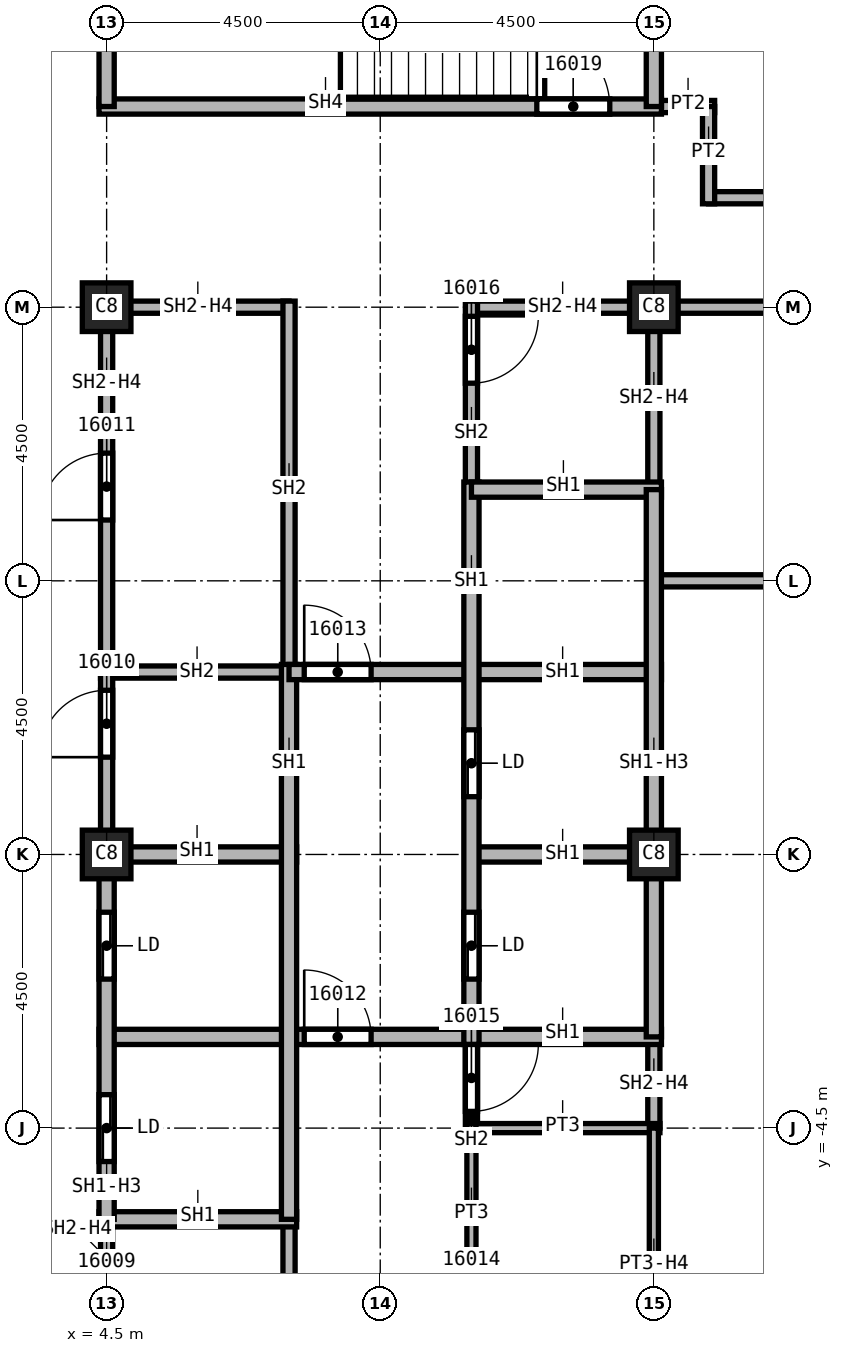
"""IFC4 building model, lengths in metres.
Left out: names, types, materials, properties, quantities, classifications, styles, units other than length and angle.
Written with IfcOpenShell. Run it as: python <this file> out.ifc"""

import sys

from ifc_helpers import new_model, si_unit, direction, frame, frame_2d, origin, origin_2d, place, context, subcontext, project, spatial, rectangle, extrude, element, fill, save


model = new_model("IFC4")
c1 = context("Model", 3, precision=1e-05, world=origin(), true_north=direction((0.0, 1.0)))
c2 = subcontext(c1, "Body", "Model", "MODEL_VIEW")
j1 = project(units=[si_unit("LENGTHUNIT", "METRE"), si_unit("PLANEANGLEUNIT", "RADIAN")], contexts=[c1])
p1 = place(None, origin())
s1 = spatial("IfcSite", under=j1, at=p1, CompositionType="ELEMENT")
p2 = place(p1, origin())
s2 = spatial("IfcBuilding", under=s1, at=p2, CompositionType="ELEMENT")
p3 = place(p2, frame((0.0, 0.0, 246.0)))
s3 = spatial("IfcBuildingStorey", under=s2, at=p3, CompositionType="ELEMENT", Elevation=246.0)
for number, where, z_axis, x_axis in (
    (1, (4.5, 0.0, 0.0), (0.0, 0.0, 1.0), (1.0, 0.0, 0.0)),
    (2, (4.5, 9.0, 0.0), (0.0, 0.0, 1.0), (1.0, 0.0, 0.0)),
    (3, (13.5, 0.0, 0.0), (0.0, 0.0, 1.0), (1.0, 0.0, 0.0)),
    (4, (13.5, 9.0, 0.0), (0.0, 0.0, 1.0), (1.0, 0.0, 0.0)),
):
    element("IfcColumn", number, at=place(p3, frame(where, z_axis=z_axis, x_axis=x_axis)), inside=s3, PredefinedType="COLUMN", context=c2, shape_type="SweptSolid", body=[
        extrude(rectangle(XDim=0.8, YDim=0.8, at=origin_2d()), origin(), (0.0, 0.0, 1.0), 3.72),
    ])
p4 = place(p3, frame((13.375, 12.3, 0.0), z_axis=(0.0, 0.0, 1.0), x_axis=(1.0, 0.0, 0.0)))
e5 = element("IfcWall", 5, at=p4, inside=s3, PredefinedType="PARTITIONING", context=c2, shape_type="SweptSolid", body=[
    extrude(rectangle(XDim=1.125, YDim=0.2, at=frame_2d((0.562, 0.0))), origin(), (0.0, 0.0, 1.0), 3.72),
])
for number, where, z_axis, x_axis in (
    (6, (13.5, 4.5, 0.0), (0.0, 0.0, 1.0), (1.0, 0.0, 0.0)),
    (7, (18.0, 9.0, 0.0), (0.0, 0.0, 1.0), (-1.0, 0.0, 0.0)),
):
    element("IfcWall", number, at=place(p3, frame(where, z_axis=z_axis, x_axis=x_axis)), inside=s3, PredefinedType="PARTITIONING", context=c2, shape_type="SweptSolid", body=[
        extrude(rectangle(XDim=4.5, YDim=0.2, at=frame_2d((2.25, 0.0))), origin(), (0.0, 0.0, 1.0), 3.72),
    ])
p5 = place(p3, frame((14.4, 10.8, 0.0), z_axis=(0.0, 0.0, 1.0), x_axis=(1.0, 0.0, 0.0)))
e8 = element("IfcWall", 8, at=p5, inside=s3, PredefinedType="PARTITIONING", context=c2, shape_type="SweptSolid", body=[
    extrude(rectangle(XDim=3.6, YDim=0.2, at=frame_2d((1.8, 0.0))), origin(), (0.0, 0.0, 1.0), 3.72),
])
p6 = place(p3, frame((14.4, 12.3, 0.0), z_axis=(0.0, 0.0, 1.0), x_axis=(0.0, -1.0, 0.0)))
e9 = element("IfcWall", 9, at=p6, inside=s3, PredefinedType="PARTITIONING", context=c2, shape_type="SweptSolid", body=[
    extrude(rectangle(XDim=1.6, YDim=0.2, at=frame_2d((0.8, 0.0))), origin(), (0.0, 0.0, 1.0), 3.72),
])
p7 = place(p3, frame((4.4, 3.0, 0.0), z_axis=(0.0, 0.0, 1.0), x_axis=(1.0, 0.0, 0.0)))
e10 = element("IfcWall", 10, at=p7, inside=s3, PredefinedType="SOLIDWALL", context=c2, shape_type="SweptSolid", body=[
    extrude(rectangle(XDim=3.225, YDim=0.2, at=frame_2d((1.613, 0.0))), origin(), (0.0, 0.0, 1.0), 3.72),
])
p8 = place(p3, frame((4.5, -9.1, 0.0), z_axis=(0.0, 0.0, 1.0), x_axis=(0.0, 1.0, 0.0)))
e11 = element("IfcWall", 11, at=p8, inside=s3, PredefinedType="SOLIDWALL", context=c2, shape_type="SweptSolid", body=[
    extrude(rectangle(XDim=3.1, YDim=0.2, at=frame_2d((1.55, 0.0))), origin(), (0.0, 0.0, 1.0), 3.042),
])
p9 = place(p8, frame((0.85, 0.0, 0.0)))
e12 = element("IfcOpeningElement", 12, at=p9, cuts=e11, PredefinedType="OPENING", context=c2, shape_type="SweptSolid", body=[
    extrude(rectangle(XDim=1.1, YDim=2.1, at=frame_2d((0.55, 1.05))), frame((0.0, 0.1, 0.0), z_axis=(0.0, -1.0, 0.0), x_axis=(1.0, 0.0, 0.0)), (0.0, 0.0, 1.0), 0.2),
])
p10 = place(p3, frame((4.5, 0.0, 0.0), z_axis=(0.0, 0.0, 1.0), x_axis=(0.0, 1.0, 0.0)))
e13 = element("IfcWall", 13, at=p10, inside=s3, PredefinedType="SOLIDWALL", context=c2, shape_type="SweptSolid", body=[
    extrude(rectangle(XDim=9.1, YDim=0.2, at=frame_2d((4.55, 0.0))), origin(), (0.0, 0.0, 1.0), 3.042),
])
p11 = place(p10, frame((1.6, 0.0, 0.0)))
e14 = element("IfcOpeningElement", 14, at=p11, cuts=e13, PredefinedType="OPENING", context=c2, shape_type="SweptSolid", body=[
    extrude(rectangle(XDim=1.1, YDim=2.1, at=frame_2d((0.55, 1.05))), frame((0.0, 0.1, 0.0), z_axis=(0.0, -1.0, 0.0), x_axis=(1.0, 0.0, 0.0)), (0.0, 0.0, 1.0), 0.2),
])
p12 = place(p10, frame((5.5, 0.0, 0.0)))
e15 = element("IfcOpeningElement", 15, at=p12, cuts=e13, PredefinedType="OPENING", context=c2, shape_type="SweptSolid", body=[
    extrude(rectangle(XDim=1.1, YDim=2.1, at=frame_2d((0.55, 1.05))), frame((0.0, 0.1, 0.0), z_axis=(0.0, -1.0, 0.0), x_axis=(1.0, 0.0, 0.0)), (0.0, 0.0, 1.0), 0.2),
])
p13 = place(p3, frame((4.5, 9.0, 0.0), z_axis=(0.0, 0.0, 1.0), x_axis=(1.0, 0.0, 0.0)))
e16 = element("IfcWall", 16, at=p13, inside=s3, PredefinedType="SOLIDWALL", context=c2, shape_type="SweptSolid", body=[
    extrude(rectangle(XDim=3.0, YDim=0.2, at=frame_2d((1.5, 0.0))), origin(), (0.0, 0.0, 1.0), 3.042),
])
p14 = place(p3, frame((7.5, -6.0, 0.0), z_axis=(0.0, 0.0, 1.0), x_axis=(0.0, -1.0, 0.0)))
e17 = element("IfcWall", 17, at=p14, inside=s3, PredefinedType="SOLIDWALL", context=c2, shape_type="SweptSolid", body=[
    extrude(rectangle(XDim=3.1, YDim=0.2, at=frame_2d((1.55, 0.0))), origin(), (0.0, 0.0, 1.0), 3.72),
])
p15 = place(p3, frame((7.5, 9.1, 0.0), z_axis=(0.0, 0.0, 1.0), x_axis=(0.0, -1.0, 0.0)))
e18 = element("IfcWall", 18, at=p15, inside=s3, PredefinedType="SOLIDWALL", context=c2, shape_type="SweptSolid", body=[
    extrude(rectangle(XDim=6.225, YDim=0.2, at=frame_2d((3.113, 0.0))), origin(), (0.0, 0.0, 1.0), 3.72),
])
p16 = place(p3, frame((10.5, -2.875, 0.0), z_axis=(0.0, 0.0, 1.0), x_axis=(0.0, -1.0, 0.0)))
e19 = element("IfcWall", 19, at=p16, inside=s3, PredefinedType="SOLIDWALL", context=c2, shape_type="SweptSolid", body=[
    extrude(rectangle(XDim=1.7, YDim=0.2, at=frame_2d((0.85, 0.0))), origin(), (0.0, 0.0, 1.0), 3.72),
])
p17 = place(p16, frame((0.25, 0.0, 0.0)))
e20 = element("IfcOpeningElement", 20, at=p17, cuts=e19, PredefinedType="OPENING", context=c2, shape_type="SweptSolid", body=[
    extrude(rectangle(XDim=1.1, YDim=2.1, at=frame_2d((0.55, 1.05))), frame((0.0, 0.1, 0.0), z_axis=(0.0, -1.0, 0.0), x_axis=(1.0, 0.0, 0.0)), (0.0, 0.0, 1.0), 0.2),
])
p18 = place(p3, frame((10.5, 9.0, 0.0), z_axis=(0.0, 0.0, 1.0), x_axis=(1.0, 0.0, 0.0)))
e21 = element("IfcWall", 21, at=p18, inside=s3, PredefinedType="SOLIDWALL", context=c2, shape_type="SweptSolid", body=[
    extrude(rectangle(XDim=3.1, YDim=0.2, at=frame_2d((1.55, 0.0))), origin(), (0.0, 0.0, 1.0), 3.042),
])
p19 = place(p3, frame((10.5, 9.1, 0.0), z_axis=(0.0, 0.0, 1.0), x_axis=(0.0, -1.0, 0.0)))
e22 = element("IfcWall", 22, at=p19, inside=s3, PredefinedType="SOLIDWALL", context=c2, shape_type="SweptSolid", body=[
    extrude(rectangle(XDim=3.225, YDim=0.2, at=frame_2d((1.613, 0.0))), origin(), (0.0, 0.0, 1.0), 3.72),
])
p20 = place(p19, frame((0.25, 0.0, 0.0)))
e23 = element("IfcOpeningElement", 23, at=p20, cuts=e22, PredefinedType="OPENING", context=c2, shape_type="SweptSolid", body=[
    extrude(rectangle(XDim=1.1, YDim=2.1, at=frame_2d((0.55, 1.05))), frame((0.0, 0.1, 0.0), z_axis=(0.0, -1.0, 0.0), x_axis=(1.0, 0.0, 0.0)), (0.0, 0.0, 1.0), 0.2),
])
p21 = place(p3, frame((13.5, -3.0, 0.0), z_axis=(0.0, 0.0, 1.0), x_axis=(0.0, -1.0, 0.0)))
e24 = element("IfcWall", 24, at=p21, inside=s3, PredefinedType="SOLIDWALL", context=c2, shape_type="SweptSolid", body=[
    extrude(rectangle(XDim=1.5, YDim=0.2, at=frame_2d((0.75, 0.0))), origin(), (0.0, 0.0, 1.0), 3.042),
])
p22 = place(p3, frame((13.5, 9.1, 0.0), z_axis=(0.0, 0.0, 1.0), x_axis=(0.0, -1.0, 0.0)))
e25 = element("IfcWall", 25, at=p22, inside=s3, PredefinedType="SOLIDWALL", context=c2, shape_type="SweptSolid", body=[
    extrude(rectangle(XDim=3.1, YDim=0.2, at=frame_2d((1.55, 0.0))), origin(), (0.0, 0.0, 1.0), 3.042),
])
p23 = place(p3, frame((4.375, -6.0, 0.0), z_axis=(0.0, 0.0, 1.0), x_axis=(1.0, 0.0, 0.0)))
e26 = element("IfcWall", 26, at=p23, inside=s3, PredefinedType="SOLIDWALL", context=c2, shape_type="SweptSolid", body=[
    extrude(rectangle(XDim=3.25, YDim=0.25, at=frame_2d((1.625, 0.0))), origin(), (0.0, 0.0, 1.0), 3.72),
])
p24 = place(p3, frame((4.375, -3.0, 0.0), z_axis=(0.0, 0.0, 1.0), x_axis=(1.0, 0.0, 0.0)))
e27 = element("IfcWall", 27, at=p24, inside=s3, PredefinedType="SOLIDWALL", context=c2, shape_type="SweptSolid", body=[
    extrude(rectangle(XDim=9.25, YDim=0.25, at=frame_2d((4.625, 0.0))), origin(), (0.0, 0.0, 1.0), 3.72),
])
p25 = place(p24, frame((3.375, 0.0, 0.0)))
e28 = element("IfcOpeningElement", 28, at=p25, cuts=e27, PredefinedType="OPENING", context=c2, shape_type="SweptSolid", body=[
    extrude(rectangle(XDim=1.1, YDim=2.1, at=frame_2d((0.55, 1.05))), frame((0.0, 0.125, 0.0), z_axis=(0.0, -1.0, 0.0), x_axis=(1.0, 0.0, 0.0)), (0.0, 0.0, 1.0), 0.25),
])
p26 = place(p3, frame((4.375, 0.0, 0.0), z_axis=(0.0, 0.0, 1.0), x_axis=(1.0, 0.0, 0.0)))
e29 = element("IfcWall", 29, at=p26, inside=s3, PredefinedType="SOLIDWALL", context=c2, shape_type="SweptSolid", body=[
    extrude(rectangle(XDim=3.25, YDim=0.25, at=frame_2d((1.625, 0.0))), origin(), (0.0, 0.0, 1.0), 3.72),
])
p27 = place(p3, frame((4.5, -6.0, 0.0), z_axis=(0.0, 0.0, 1.0), x_axis=(0.0, 1.0, 0.0)))
e30 = element("IfcWall", 30, at=p27, inside=s3, PredefinedType="SOLIDWALL", context=c2, shape_type="SweptSolid", body=[
    extrude(rectangle(XDim=6.0, YDim=0.25, at=frame_2d((3.0, 0.0))), origin(), (0.0, 0.0, 1.0), 3.042),
])
p28 = place(p27, frame((0.95, 0.0, 0.0)))
e31 = element("IfcOpeningElement", 31, at=p28, cuts=e30, PredefinedType="OPENING", context=c2, shape_type="SweptSolid", body=[
    extrude(rectangle(XDim=1.1, YDim=2.1, at=frame_2d((0.55, 1.05))), frame((0.0, 0.125, 0.0), z_axis=(0.0, -1.0, 0.0), x_axis=(1.0, 0.0, 0.0)), (0.0, 0.0, 1.0), 0.25),
])
p29 = place(p27, frame((3.95, 0.0, 0.0)))
e32 = element("IfcOpeningElement", 32, at=p29, cuts=e30, PredefinedType="OPENING", context=c2, shape_type="SweptSolid", body=[
    extrude(rectangle(XDim=1.1, YDim=2.1, at=frame_2d((0.55, 1.05))), frame((0.0, 0.125, 0.0), z_axis=(0.0, -1.0, 0.0), x_axis=(1.0, 0.0, 0.0)), (0.0, 0.0, 1.0), 0.25),
])
p30 = place(p3, frame((7.5, 3.125, 0.0), z_axis=(0.0, 0.0, 1.0), x_axis=(0.0, -1.0, 0.0)))
e33 = element("IfcWall", 33, at=p30, inside=s3, PredefinedType="SOLIDWALL", context=c2, shape_type="SweptSolid", body=[
    extrude(rectangle(XDim=9.125, YDim=0.25, at=frame_2d((4.562, 0.0))), origin(), (0.0, 0.0, 1.0), 3.72),
])
p31 = place(p3, frame((7.5, 3.0, 0.0), z_axis=(0.0, 0.0, 1.0), x_axis=(1.0, 0.0, 0.0)))
e34 = element("IfcWall", 34, at=p31, inside=s3, PredefinedType="SOLIDWALL", context=c2, shape_type="SweptSolid", body=[
    extrude(rectangle(XDim=6.125, YDim=0.25, at=frame_2d((3.062, 0.0))), origin(), (0.0, 0.0, 1.0), 3.72),
])
p32 = place(p31, frame((0.25, 0.0, 0.0)))
e35 = element("IfcOpeningElement", 35, at=p32, cuts=e34, PredefinedType="OPENING", context=c2, shape_type="SweptSolid", body=[
    extrude(rectangle(XDim=1.1, YDim=2.1, at=frame_2d((0.55, 1.05))), frame((0.0, 0.125, 0.0), z_axis=(0.0, -1.0, 0.0), x_axis=(1.0, 0.0, 0.0)), (0.0, 0.0, 1.0), 0.25),
])
p33 = place(p3, frame((10.5, 0.0, 0.0), z_axis=(0.0, 0.0, 1.0), x_axis=(1.0, 0.0, 0.0)))
e36 = element("IfcWall", 36, at=p33, inside=s3, PredefinedType="SOLIDWALL", context=c2, shape_type="SweptSolid", body=[
    extrude(rectangle(XDim=3.125, YDim=0.25, at=frame_2d((1.562, 0.0))), origin(), (0.0, 0.0, 1.0), 3.72),
])
p34 = place(p3, frame((10.5, 6.125, 0.0), z_axis=(0.0, 0.0, 1.0), x_axis=(0.0, -1.0, 0.0)))
e37 = element("IfcWall", 37, at=p34, inside=s3, PredefinedType="SOLIDWALL", context=c2, shape_type="SweptSolid", body=[
    extrude(rectangle(XDim=9.25, YDim=0.25, at=frame_2d((4.625, 0.0))), origin(), (0.0, 0.0, 1.0), 3.72),
])
p35 = place(p34, frame((7.075, 0.0, 0.0)))
e38 = element("IfcOpeningElement", 38, at=p35, cuts=e37, PredefinedType="OPENING", context=c2, shape_type="SweptSolid", body=[
    extrude(rectangle(XDim=1.1, YDim=2.1, at=frame_2d((0.55, 1.05))), frame((0.0, 0.125, 0.0), z_axis=(0.0, -1.0, 0.0), x_axis=(1.0, 0.0, 0.0)), (0.0, 0.0, 1.0), 0.25),
])
p36 = place(p34, frame((4.075, 0.0, 0.0)))
e39 = element("IfcOpeningElement", 39, at=p36, cuts=e37, PredefinedType="OPENING", context=c2, shape_type="SweptSolid", body=[
    extrude(rectangle(XDim=1.1, YDim=2.1, at=frame_2d((0.55, 1.05))), frame((0.0, 0.125, 0.0), z_axis=(0.0, -1.0, 0.0), x_axis=(1.0, 0.0, 0.0)), (0.0, 0.0, 1.0), 0.25),
])
p37 = place(p3, frame((10.5, 6.0, 0.0), z_axis=(0.0, 0.0, 1.0), x_axis=(1.0, 0.0, 0.0)))
e40 = element("IfcWall", 40, at=p37, inside=s3, PredefinedType="SOLIDWALL", context=c2, shape_type="SweptSolid", body=[
    extrude(rectangle(XDim=3.125, YDim=0.25, at=frame_2d((1.562, 0.0))), origin(), (0.0, 0.0, 1.0), 3.72),
])
p38 = place(p3, frame((13.5, 6.0, 0.0), z_axis=(0.0, 0.0, 1.0), x_axis=(0.0, -1.0, 0.0)))
e41 = element("IfcWall", 41, at=p38, inside=s3, PredefinedType="SOLIDWALL", context=c2, shape_type="SweptSolid", body=[
    extrude(rectangle(XDim=9.0, YDim=0.25, at=frame_2d((4.5, 0.0))), origin(), (0.0, 0.0, 1.0), 3.042),
])
p39 = place(p3, frame((4.375, 12.3, 0.0), z_axis=(0.0, 0.0, 1.0), x_axis=(1.0, 0.0, 0.0)))
e42 = element("IfcWall", 42, at=p39, inside=s3, PredefinedType="SOLIDWALL", context=c2, shape_type="SweptSolid", body=[
    extrude(rectangle(XDim=9.25, YDim=0.25, at=frame_2d((4.625, 0.0))), origin(), (0.0, 0.0, 1.0), 3.72),
])
p40 = place(p39, frame((7.2, 0.0, 0.0)))
e43 = element("IfcOpeningElement", 43, at=p40, cuts=e42, PredefinedType="OPENING", context=c2, shape_type="SweptSolid", body=[
    extrude(rectangle(XDim=1.2, YDim=2.1, at=frame_2d((0.6, 1.05))), frame((0.0, 0.125, 0.0), z_axis=(0.0, -1.0, 0.0), x_axis=(1.0, 0.0, 0.0)), (0.0, 0.0, 1.0), 0.25),
])
for number, where, z_axis, x_axis in (
    (44, (4.5, 12.3, 0.0), (0.0, 0.0, 1.0), (0.0, 1.0, 0.0)),
    (45, (13.5, 16.8, 0.0), (0.0, 0.0, 1.0), (0.0, -1.0, 0.0)),
):
    element("IfcWall", number, at=place(p3, frame(where, z_axis=z_axis, x_axis=x_axis)), inside=s3, PredefinedType="SOLIDWALL", context=c2, shape_type="SweptSolid", body=[
        extrude(rectangle(XDim=4.5, YDim=0.25, at=frame_2d((2.25, 0.0))), origin(), (0.0, 0.0, 1.0), 3.72),
    ])
p41 = place(p3, frame((10.5, -4.5, 0.0), z_axis=(0.0, 0.0, 1.0), x_axis=(1.0, 0.0, 0.0)))
e46 = element("IfcWall", 46, at=p41, inside=s3, PredefinedType="PARTITIONING", context=c2, shape_type="SweptSolid", body=[
    extrude(rectangle(XDim=3.1, YDim=0.15, at=frame_2d((1.55, 0.0))), origin(), (0.0, 0.0, 1.0), 3.72),
])
p42 = place(p3, frame((10.5, -4.425, 0.0), z_axis=(0.0, 0.0, 1.0), x_axis=(0.0, -1.0, 0.0)))
e47 = element("IfcWall", 47, at=p42, inside=s3, PredefinedType="PARTITIONING", context=c2, shape_type="SweptSolid", body=[
    extrude(rectangle(XDim=4.65, YDim=0.15, at=frame_2d((2.325, 0.0))), origin(), (0.0, 0.0, 1.0), 3.72),
])
p43 = place(p42, frame((2.8, 0.0, 0.0)))
e48 = element("IfcOpeningElement", 48, at=p43, cuts=e47, PredefinedType="OPENING", context=c2, shape_type="SweptSolid", body=[
    extrude(rectangle(XDim=0.9, YDim=2.1, at=frame_2d((0.45, 1.05))), frame((0.0, 0.075, 0.0), z_axis=(0.0, -1.0, 0.0), x_axis=(1.0, 0.0, 0.0)), (0.0, 0.0, 1.0), 0.15),
])
p44 = place(p3, frame((13.5, -4.5, 0.0), z_axis=(0.0, 0.0, 1.0), x_axis=(0.0, -1.0, 0.0)))
e49 = element("IfcWall", 49, at=p44, inside=s3, PredefinedType="PARTITIONING", context=c2, shape_type="SweptSolid", body=[
    extrude(rectangle(XDim=4.6, YDim=0.15, at=frame_2d((2.3, 0.0))), origin(), (0.0, 0.0, 1.0), 3.042),
])
p45 = place(p11, origin())
e50 = element("IfcDoor", 50, at=p45, inside=s3, OperationType="SINGLE_SWING_LEFT", PredefinedType="DOOR", context=c2, shape_type="SweptSolid", body=[
    extrude(rectangle(XDim=1.1, YDim=2.1, at=frame_2d((0.55, 1.05))), frame((0.0, 0.025, 0.0), z_axis=(0.0, -1.0, 0.0), x_axis=(1.0, 0.0, 0.0)), (0.0, 0.0, 1.0), 0.05),
])
fill(e14, e50)
p46 = place(p12, origin())
e51 = element("IfcDoor", 51, at=p46, inside=s3, OperationType="SINGLE_SWING_RIGHT", PredefinedType="DOOR", context=c2, shape_type="SweptSolid", body=[
    extrude(rectangle(XDim=1.1, YDim=2.1, at=frame_2d((0.55, 1.05))), frame((0.0, 0.025, 0.0), z_axis=(0.0, -1.0, 0.0), x_axis=(1.0, 0.0, 0.0)), (0.0, 0.0, 1.0), 0.05),
])
fill(e15, e51)
p47 = place(p25, origin())
e52 = element("IfcDoor", 52, at=p47, inside=s3, OperationType="SINGLE_SWING_LEFT", PredefinedType="DOOR", context=c2, shape_type="SweptSolid", body=[
    extrude(rectangle(XDim=1.1, YDim=2.1, at=frame_2d((0.55, 1.05))), frame((0.0, 0.025, 0.0), z_axis=(0.0, -1.0, 0.0), x_axis=(1.0, 0.0, 0.0)), (0.0, 0.0, 1.0), 0.05),
])
fill(e28, e52)
p48 = place(p32, origin())
e53 = element("IfcDoor", 53, at=p48, inside=s3, OperationType="SINGLE_SWING_RIGHT", PredefinedType="DOOR", context=c2, shape_type="SweptSolid", body=[
    extrude(rectangle(XDim=1.1, YDim=2.1, at=frame_2d((0.55, 1.05))), frame((0.0, 0.025, 0.0), z_axis=(0.0, -1.0, 0.0), x_axis=(1.0, 0.0, 0.0)), (0.0, 0.0, 1.0), 0.05),
])
fill(e35, e53)
p49 = place(p17, origin())
e54 = element("IfcDoor", 54, at=p49, inside=s3, OperationType="SINGLE_SWING_RIGHT", PredefinedType="DOOR", context=c2, shape_type="SweptSolid", body=[
    extrude(rectangle(XDim=1.1, YDim=2.1, at=frame_2d((0.55, 1.05))), frame((0.0, 0.025, 0.0), z_axis=(0.0, -1.0, 0.0), x_axis=(1.0, 0.0, 0.0)), (0.0, 0.0, 1.0), 0.05),
])
fill(e20, e54)
p50 = place(p20, origin())
e55 = element("IfcDoor", 55, at=p50, inside=s3, OperationType="SINGLE_SWING_LEFT", PredefinedType="DOOR", context=c2, shape_type="SweptSolid", body=[
    extrude(rectangle(XDim=1.1, YDim=2.1, at=frame_2d((0.55, 1.05))), frame((0.0, 0.025, 0.0), z_axis=(0.0, -1.0, 0.0), x_axis=(1.0, 0.0, 0.0)), (0.0, 0.0, 1.0), 0.05),
])
fill(e23, e55)
p51 = place(p40, origin())
e56 = element("IfcDoor", 56, at=p51, inside=s3, OperationType="SINGLE_SWING_RIGHT", PredefinedType="DOOR", context=c2, shape_type="SweptSolid", body=[
    extrude(rectangle(XDim=1.2, YDim=2.1, at=frame_2d((0.6, 1.05))), frame((0.0, 0.025, 0.0), z_axis=(0.0, -1.0, 0.0), x_axis=(1.0, 0.0, 0.0)), (0.0, 0.0, 1.0), 0.05),
])
fill(e43, e56)
p52 = place(p28, origin())
e57 = element("IfcDoor", 57, at=p52, inside=s3, OperationType="SLIDING_TO_LEFT", PredefinedType="DOOR", context=c2, shape_type="SweptSolid", body=[
    extrude(rectangle(XDim=1.1, YDim=2.1, at=frame_2d((0.55, 1.05))), frame((0.0, 0.025, 0.0), z_axis=(0.0, -1.0, 0.0), x_axis=(1.0, 0.0, 0.0)), (0.0, 0.0, 1.0), 0.05),
])
fill(e31, e57)
p53 = place(p29, origin())
e58 = element("IfcDoor", 58, at=p53, inside=s3, OperationType="SLIDING_TO_LEFT", PredefinedType="DOOR", context=c2, shape_type="SweptSolid", body=[
    extrude(rectangle(XDim=1.1, YDim=2.1, at=frame_2d((0.55, 1.05))), frame((0.0, 0.025, 0.0), z_axis=(0.0, -1.0, 0.0), x_axis=(1.0, 0.0, 0.0)), (0.0, 0.0, 1.0), 0.05),
])
fill(e32, e58)
p54 = place(p35, origin())
e59 = element("IfcDoor", 59, at=p54, inside=s3, OperationType="SLIDING_TO_LEFT", PredefinedType="DOOR", context=c2, shape_type="SweptSolid", body=[
    extrude(rectangle(XDim=1.1, YDim=2.1, at=frame_2d((0.55, 1.05))), frame((0.0, 0.025, 0.0), z_axis=(0.0, -1.0, 0.0), x_axis=(1.0, 0.0, 0.0)), (0.0, 0.0, 1.0), 0.05),
])
fill(e38, e59)
p55 = place(p36, origin())
e60 = element("IfcDoor", 60, at=p55, inside=s3, OperationType="SLIDING_TO_LEFT", PredefinedType="DOOR", context=c2, shape_type="SweptSolid", body=[
    extrude(rectangle(XDim=1.1, YDim=2.1, at=frame_2d((0.55, 1.05))), frame((0.0, 0.025, 0.0), z_axis=(0.0, -1.0, 0.0), x_axis=(1.0, 0.0, 0.0)), (0.0, 0.0, 1.0), 0.05),
])
fill(e39, e60)
save(model, sys.argv[1])
